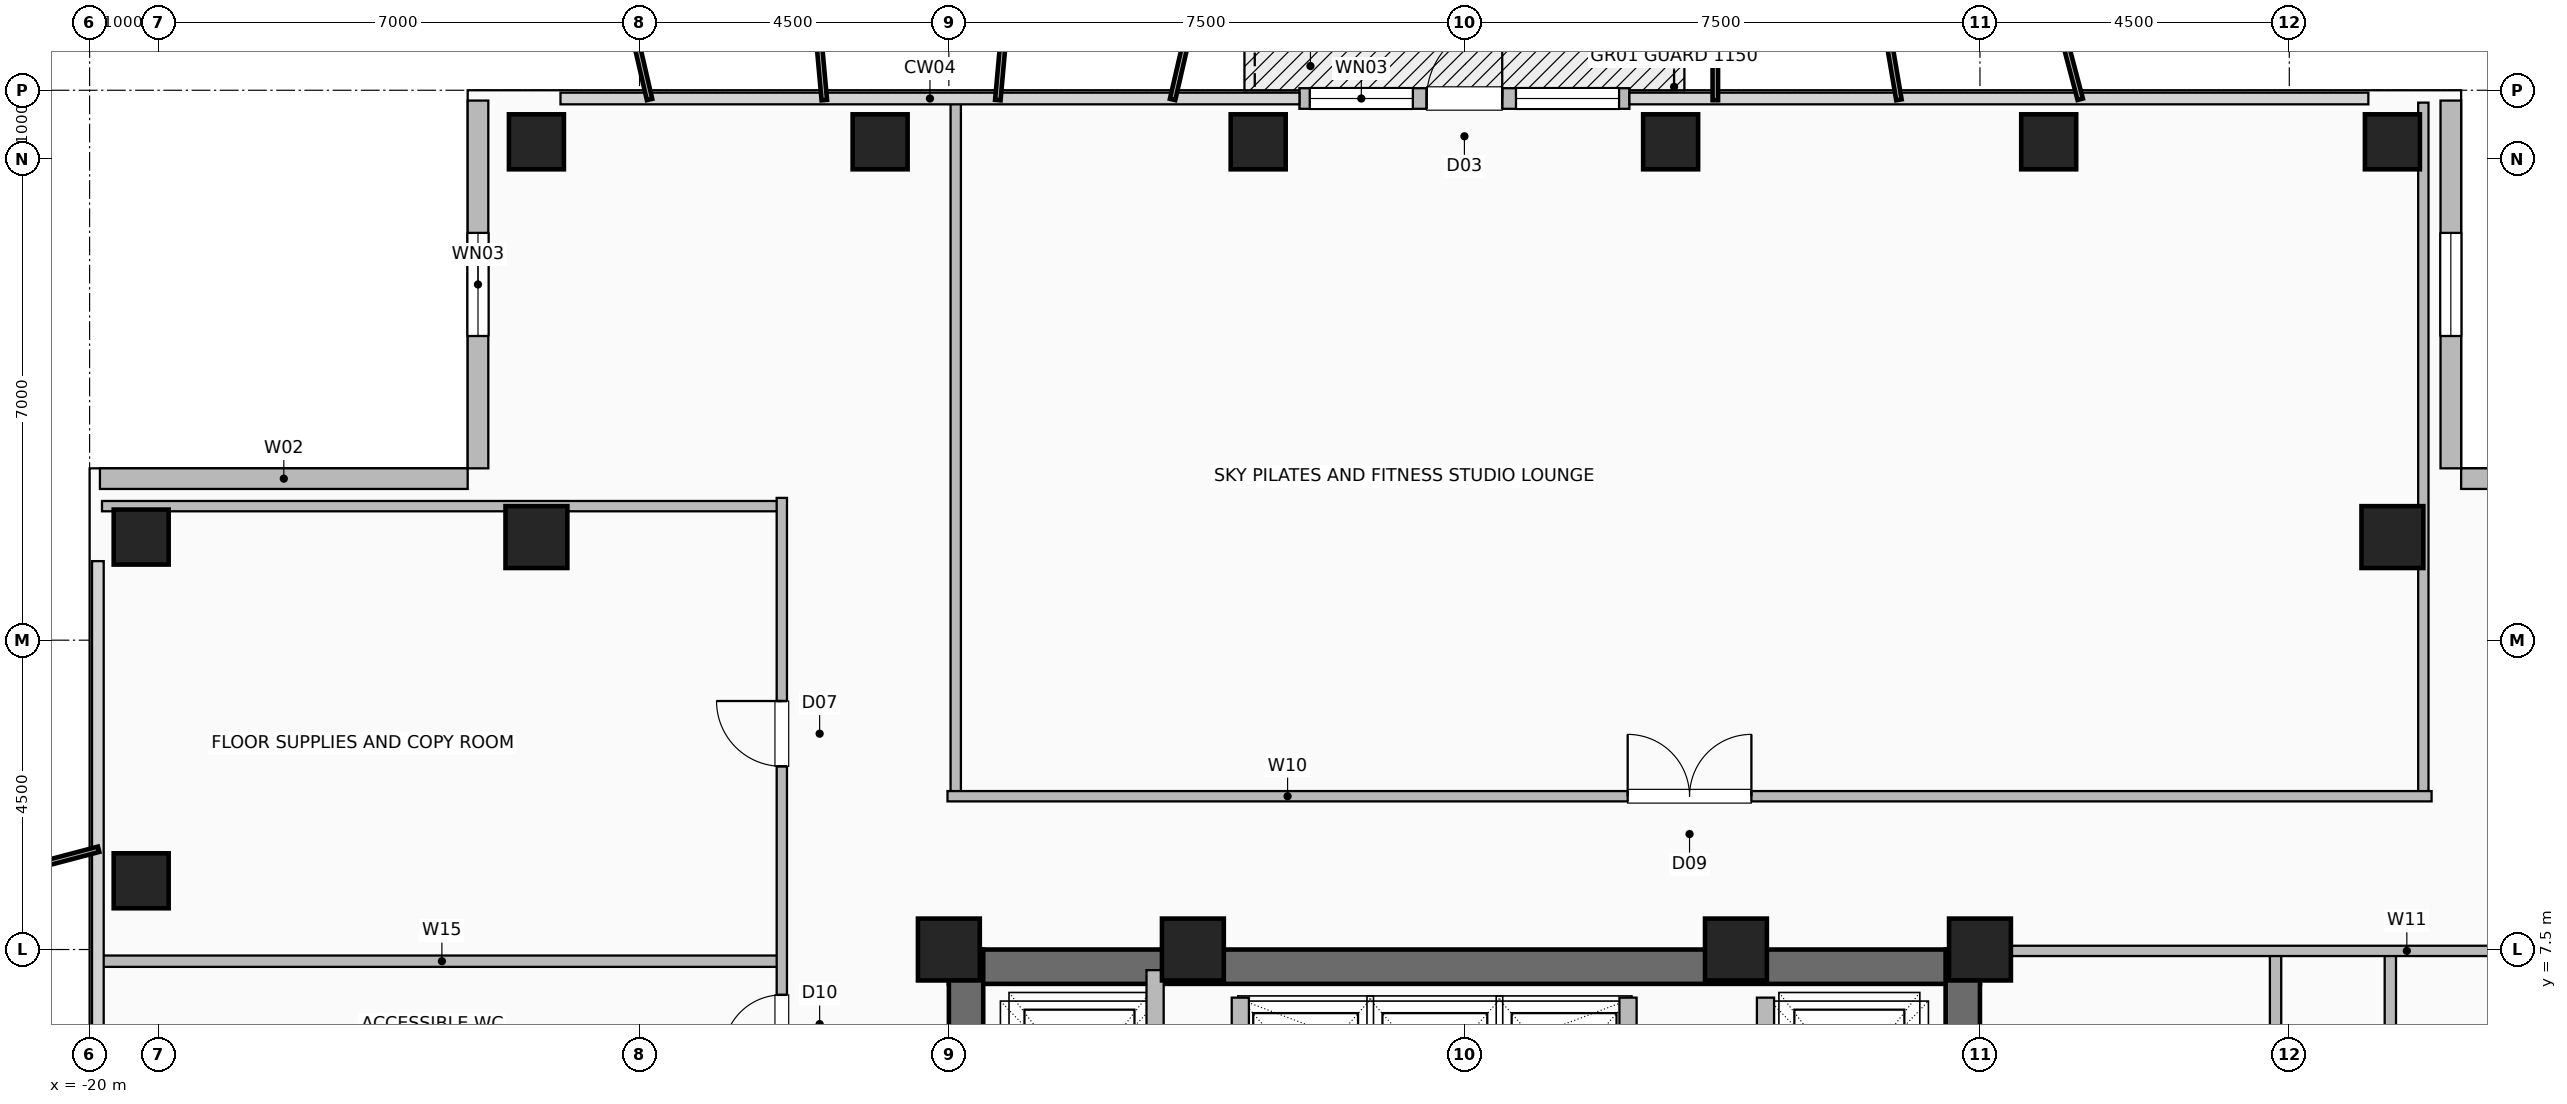
"""IFC4 building model, lengths in metres.
Left out: names, types, materials, properties, quantities, classifications, styles, units other than length and angle.
Written with IfcOpenShell. Run it as: python <this file> out.ifc"""

import sys

from ifc_helpers import new_model, si_unit, direction, frame, frame_2d, origin, origin_2d, place, context, subcontext, project, spatial, rectangle, hollow_rectangle, extrude, element, fill, save


model = new_model("IFC4")
c1 = context("Model", 3, precision=1e-05, world=origin(), true_north=direction((0.0, 1.0)))
c2 = subcontext(c1, "Body", "Model", "MODEL_VIEW")
j1 = project(units=[si_unit("LENGTHUNIT", "METRE"), si_unit("PLANEANGLEUNIT", "RADIAN")], contexts=[c1])
p1 = place(None, origin())
s1 = spatial("IfcSite", under=j1, at=p1, CompositionType="ELEMENT")
p2 = place(p1, origin())
s2 = spatial("IfcBuilding", under=s1, at=p2, CompositionType="ELEMENT")
p3 = place(p2, frame((0.0, 0.0, 205.8)))
s3 = spatial("IfcBuildingStorey", under=s2, at=p3, CompositionType="ELEMENT", Elevation=205.8)
for number, where, z_axis, x_axis in (
    (1, (7.5, 7.5, 0.0), (0.0, 0.0, 1.0), (1.0, 0.0, 0.0)),
    (2, (3.95, 7.5, 0.0), (0.0, 0.0, 1.0), (1.0, 0.0, 0.0)),
    (3, (-3.95, 7.5, 0.0), (0.0, 0.0, 1.0), (1.0, 0.0, 0.0)),
    (4, (-7.5, 7.5, 0.0), (0.0, 0.0, 1.0), (1.0, 0.0, 0.0)),
):
    element("IfcColumn", number, at=place(p3, frame(where, z_axis=z_axis, x_axis=x_axis)), inside=s3, PredefinedType="COLUMN", context=c2, shape_type="SweptSolid", body=[
        extrude(hollow_rectangle(XDim=0.9, YDim=0.9, WallThickness=0.045, at=origin_2d()), origin(), (0.0, 0.0, 1.0), 3.6),
    ])
for number, where, z_axis, x_axis in (
    (5, (-13.5, 19.25, 0.0), (0.0, 0.0, 1.0), (1.0, 0.0, 0.0)),
    (6, (-8.5, 19.25, 0.0), (0.0, 0.0, 1.0), (1.0, 0.0, 0.0)),
    (7, (-3.0, 19.25, 0.0), (0.0, 0.0, 1.0), (1.0, 0.0, 0.0)),
    (8, (3.0, 19.25, 0.0), (0.0, 0.0, 1.0), (1.0, 0.0, 0.0)),
    (9, (8.5, 19.25, 0.0), (0.0, 0.0, 1.0), (1.0, 0.0, 0.0)),
    (10, (-19.25, 8.5, 0.0), (0.0, 0.0, 1.0), (1.0, 0.0, 0.0)),
    (11, (13.5, 19.25, 0.0), (0.0, 0.0, 1.0), (1.0, 0.0, 0.0)),
    (12, (-19.25, 13.5, 0.0), (0.0, 0.0, 1.0), (1.0, 0.0, 0.0)),
):
    element("IfcColumn", number, at=place(p3, frame(where, z_axis=z_axis, x_axis=x_axis)), inside=s3, PredefinedType="COLUMN", context=c2, shape_type="SweptSolid", body=[
        extrude(hollow_rectangle(XDim=0.8, YDim=0.8, WallThickness=0.04, at=origin_2d()), origin(), (0.0, 0.0, 1.0), 3.6),
    ])
for number, where, z_axis, x_axis in (
    (13, (13.5, 13.5, 0.0), (0.0, 0.0, 1.0), (1.0, 0.0, 0.0)),
    (14, (-13.5, 13.5, 0.0), (0.0, 0.0, 1.0), (1.0, 0.0, 0.0)),
):
    element("IfcColumn", number, at=place(p3, frame(where, z_axis=z_axis, x_axis=x_axis)), inside=s3, PredefinedType="COLUMN", context=c2, shape_type="SweptSolid", body=[
        extrude(hollow_rectangle(XDim=0.9, YDim=0.9, WallThickness=0.045, at=origin_2d()), origin(), (0.0, 0.0, 1.0), 3.6),
    ])
p4 = place(p3, frame((-2.4, 19.88, 0.0), z_axis=(0.0, 0.0, 1.0), x_axis=(1.0, 0.0, 0.0)))
e15 = element("IfcWall", 15, at=p4, inside=s3, PredefinedType="SOLIDWALL", context=c2, shape_type="SweptSolid", body=[
    extrude(rectangle(XDim=4.8, YDim=0.3, at=frame_2d((2.4, 0.0))), origin(), (0.0, 0.0, 1.0), 3.36),
])
p5 = place(p4, frame((1.85, 0.0, 0.0)))
e16 = element("IfcOpeningElement", 16, at=p5, cuts=e15, PredefinedType="OPENING", context=c2, shape_type="SweptSolid", body=[
    extrude(rectangle(XDim=1.1, YDim=2.2, at=frame_2d((0.55, 1.1))), frame((0.0, 0.16, 0.0), z_axis=(0.0, -1.0, 0.0), x_axis=(1.0, 0.0, 0.0)), (0.0, 0.0, 1.0), 0.32),
])
p6 = place(p4, frame((0.15, 0.0, 0.85)))
e17 = element("IfcOpeningElement", 17, at=p6, cuts=e15, PredefinedType="OPENING", context=c2, shape_type="SweptSolid", body=[
    extrude(rectangle(XDim=1.5, YDim=1.8, at=frame_2d((0.75, 0.9))), frame((0.0, 0.16, 0.0), z_axis=(0.0, -1.0, 0.0), x_axis=(1.0, 0.0, 0.0)), (0.0, 0.0, 1.0), 0.32),
])
p7 = place(p4, frame((3.15, 0.0, 0.85)))
e18 = element("IfcOpeningElement", 18, at=p7, cuts=e15, PredefinedType="OPENING", context=c2, shape_type="SweptSolid", body=[
    extrude(rectangle(XDim=1.5, YDim=1.8, at=frame_2d((0.75, 0.9))), frame((0.0, 0.16, 0.0), z_axis=(0.0, -1.0, 0.0), x_axis=(1.0, 0.0, 0.0)), (0.0, 0.0, 1.0), 0.32),
])
p8 = place(p3, frame((14.35, 19.85, 0.0), z_axis=(0.0, 0.0, 1.0), x_axis=(0.0, -1.0, 0.0)))
e19 = element("IfcWall", 19, at=p8, inside=s3, PredefinedType="SOLIDWALL", context=c2, shape_type="SweptSolid", body=[
    extrude(rectangle(XDim=5.35, YDim=0.3, at=frame_2d((2.675, 0.0))), origin(), (0.0, 0.0, 1.0), 3.36),
])
p9 = place(p8, frame((1.925, 0.0, 0.9)))
e20 = element("IfcOpeningElement", 20, at=p9, cuts=e19, PredefinedType="OPENING", context=c2, shape_type="SweptSolid", body=[
    extrude(rectangle(XDim=1.5, YDim=1.8, at=frame_2d((0.75, 0.9))), frame((0.0, 0.16, 0.0), z_axis=(0.0, -1.0, 0.0), x_axis=(1.0, 0.0, 0.0)), (0.0, 0.0, 1.0), 0.32),
])
p10 = place(p3, frame((19.85, 14.35, 0.0), z_axis=(0.0, 0.0, 1.0), x_axis=(-1.0, 0.0, 0.0)))
e21 = element("IfcWall", 21, at=p10, inside=s3, PredefinedType="SOLIDWALL", context=c2, shape_type="SweptSolid", body=[
    extrude(rectangle(XDim=5.35, YDim=0.3, at=frame_2d((2.675, 0.0))), origin(), (0.0, 0.0, 1.0), 3.36),
])
p11 = place(p3, frame((-14.35, 19.85, 0.0), z_axis=(0.0, 0.0, 1.0), x_axis=(0.0, -1.0, 0.0)))
e22 = element("IfcWall", 22, at=p11, inside=s3, PredefinedType="SOLIDWALL", context=c2, shape_type="SweptSolid", body=[
    extrude(rectangle(XDim=5.35, YDim=0.3, at=frame_2d((2.675, 0.0))), origin(), (0.0, 0.0, 1.0), 3.36),
])
p12 = place(p11, frame((1.925, 0.0, 0.9)))
e23 = element("IfcOpeningElement", 23, at=p12, cuts=e22, PredefinedType="OPENING", context=c2, shape_type="SweptSolid", body=[
    extrude(rectangle(XDim=1.5, YDim=1.8, at=frame_2d((0.75, 0.9))), frame((0.0, 0.16, 0.0), z_axis=(0.0, -1.0, 0.0), x_axis=(1.0, 0.0, 0.0)), (0.0, 0.0, 1.0), 0.32),
])
p13 = place(p3, frame((-19.85, 14.35, 0.0), z_axis=(0.0, 0.0, 1.0), x_axis=(1.0, 0.0, 0.0)))
e24 = element("IfcWall", 24, at=p13, inside=s3, PredefinedType="SOLIDWALL", context=c2, shape_type="SweptSolid", body=[
    extrude(rectangle(XDim=5.35, YDim=0.3, at=frame_2d((2.675, 0.0))), origin(), (0.0, 0.0, 1.0), 3.36),
])
p14 = place(p3, frame((-7.5, 7.25, 0.0), z_axis=(0.0, 0.0, 1.0), x_axis=(1.0, 0.0, 0.0)))
e25 = element("IfcWall", 25, at=p14, inside=s3, PredefinedType="SHEAR", context=c2, shape_type="SweptSolid", body=[
    extrude(rectangle(XDim=15.0, YDim=0.5, at=frame_2d((7.5, 0.0))), origin(), (0.0, 0.0, 1.0), 3.36),
])
p15 = place(p3, frame((-7.25, -7.5, 0.0), z_axis=(0.0, 0.0, 1.0), x_axis=(0.0, 1.0, 0.0)))
e26 = element("IfcWall", 26, at=p15, inside=s3, PredefinedType="SHEAR", context=c2, shape_type="SweptSolid", body=[
    extrude(rectangle(XDim=15.0, YDim=0.5, at=frame_2d((7.5, 0.0))), origin(), (0.0, 0.0, 1.0), 3.36),
])
p16 = place(p15, frame((9.5, 0.0, 0.0)))
e27 = element("IfcOpeningElement", 27, at=p16, cuts=e26, PredefinedType="OPENING", context=c2, shape_type="SweptSolid", body=[
    extrude(rectangle(XDim=1.0, YDim=2.08, at=frame_2d((0.5, 1.04))), frame((0.0, 0.26, 0.0), z_axis=(0.0, -1.0, 0.0), x_axis=(1.0, 0.0, 0.0)), (0.0, 0.0, 1.0), 0.52),
])
p17 = place(p3, frame((7.25, -7.5, 0.0), z_axis=(0.0, 0.0, 1.0), x_axis=(0.0, 1.0, 0.0)))
e28 = element("IfcWall", 28, at=p17, inside=s3, PredefinedType="SHEAR", context=c2, shape_type="SweptSolid", body=[
    extrude(rectangle(XDim=15.0, YDim=0.5, at=frame_2d((7.5, 0.0))), origin(), (0.0, 0.0, 1.0), 3.36),
])
for number, where, z_axis, x_axis in (
    (29, (-3.26, 4.58, 0.0), (0.0, 0.0, 1.0), (0.0, 1.0, 0.0)),
    (30, (2.38, 4.58, 0.0), (0.0, 0.0, 1.0), (0.0, 1.0, 0.0)),
):
    element("IfcWall", number, at=place(p3, frame(where, z_axis=z_axis, x_axis=x_axis)), inside=s3, PredefinedType="SHEAR", context=c2, shape_type="SweptSolid", body=[
        extrude(rectangle(XDim=2.22, YDim=0.25, at=frame_2d((1.11, 0.0))), origin(), (0.0, 0.0, 1.0), 3.36),
    ])
p18 = place(p3, frame((-4.5, 4.35, 0.0), z_axis=(0.0, 0.0, 1.0), x_axis=(0.0, 1.0, 0.0)))
e31 = element("IfcWall", 31, at=p18, inside=s3, PredefinedType="SHEAR", context=c2, shape_type="SweptSolid", body=[
    extrude(rectangle(XDim=2.85, YDim=0.25, at=frame_2d((1.425, 0.0))), origin(), (0.0, 0.0, 1.0), 3.36),
])
p19 = place(p3, frame((4.38, 4.3, 0.0), z_axis=(0.0, 0.0, 1.0), x_axis=(0.0, 1.0, 0.0)))
e32 = element("IfcWall", 32, at=p19, inside=s3, PredefinedType="SHEAR", context=c2, shape_type="SweptSolid", body=[
    extrude(rectangle(XDim=2.5, YDim=0.25, at=frame_2d((1.25, 0.0))), origin(), (0.0, 0.0, 1.0), 3.36),
])
p20 = place(p19, frame((0.8, 0.0, 0.0)))
e33 = element("IfcOpeningElement", 33, at=p20, cuts=e32, PredefinedType="OPENING", context=c2, shape_type="SweptSolid", body=[
    extrude(rectangle(XDim=1.2, YDim=2.2, at=frame_2d((0.6, 1.1))), frame((0.0, 0.135, 0.0), z_axis=(0.0, -1.0, 0.0), x_axis=(1.0, 0.0, 0.0)), (0.0, 0.0, 1.0), 0.27),
])
p21 = place(p3, frame((-19.82, 7.33, 0.0), z_axis=(0.0, 0.0, 1.0), x_axis=(1.0, 0.0, 0.0)))
e34 = element("IfcWall", 34, at=p21, inside=s3, PredefinedType="PLUMBINGWALL", context=c2, shape_type="SweptSolid", body=[
    extrude(rectangle(XDim=9.89, YDim=0.165, at=frame_2d((4.945, 0.0))), origin(), (0.0, 0.0, 1.0), 3.36),
])
p22 = place(p3, frame((-19.82, 13.95, 0.0), z_axis=(0.0, 0.0, 1.0), x_axis=(1.0, 0.0, 0.0)))
e35 = element("IfcWall", 35, at=p22, inside=s3, PredefinedType="PARTITIONING", context=c2, shape_type="SweptSolid", body=[
    extrude(rectangle(XDim=9.89, YDim=0.15, at=frame_2d((4.945, 0.0))), origin(), (0.0, 0.0, 1.0), 3.36),
])
p23 = place(p3, frame((-9.93, -7.52, 0.0), z_axis=(0.0, 0.0, 1.0), x_axis=(0.0, 1.0, 0.0)))
e36 = element("IfcWall", 36, at=p23, inside=s3, PredefinedType="PARTITIONING", context=c2, shape_type="SweptSolid", body=[
    extrude(rectangle(XDim=21.59, YDim=0.15, at=frame_2d((10.795, 0.0))), origin(), (0.0, 0.0, 1.0), 3.36),
])
p24 = place(p23, frame((2.595, 0.0, 0.0)))
e37 = element("IfcOpeningElement", 37, at=p24, cuts=e36, PredefinedType="OPENING", context=c2, shape_type="SweptSolid", body=[
    extrude(rectangle(XDim=0.95, YDim=2.06, at=frame_2d((0.475, 1.03))), frame((0.0, 0.085, 0.0), z_axis=(0.0, -1.0, 0.0), x_axis=(1.0, 0.0, 0.0)), (0.0, 0.0, 1.0), 0.17),
])
p25 = place(p23, frame((9.045, 0.0, 0.0)))
e38 = element("IfcOpeningElement", 38, at=p25, cuts=e36, PredefinedType="OPENING", context=c2, shape_type="SweptSolid", body=[
    extrude(rectangle(XDim=0.95, YDim=2.06, at=frame_2d((0.475, 1.03))), frame((0.0, 0.085, 0.0), z_axis=(0.0, -1.0, 0.0), x_axis=(1.0, 0.0, 0.0)), (0.0, 0.0, 1.0), 0.17),
])
p26 = place(p23, frame((13.51, 0.0, 0.0)))
e39 = element("IfcOpeningElement", 39, at=p26, cuts=e36, PredefinedType="OPENING", context=c2, shape_type="SweptSolid", body=[
    extrude(rectangle(XDim=0.85, YDim=2.05, at=frame_2d((0.425, 1.025))), frame((0.0, 0.085, 0.0), z_axis=(0.0, -1.0, 0.0), x_axis=(1.0, 0.0, 0.0)), (0.0, 0.0, 1.0), 0.17),
])
p27 = place(p23, frame((17.685, 0.0, 0.0)))
e40 = element("IfcOpeningElement", 40, at=p27, cuts=e36, PredefinedType="OPENING", context=c2, shape_type="SweptSolid", body=[
    extrude(rectangle(XDim=0.95, YDim=2.06, at=frame_2d((0.475, 1.03))), frame((0.0, 0.085, 0.0), z_axis=(0.0, -1.0, 0.0), x_axis=(1.0, 0.0, 0.0)), (0.0, 0.0, 1.0), 0.17),
])
for number, where, z_axis, x_axis in (
    (41, (-7.4, 9.73, 0.0), (0.0, 0.0, 1.0), (0.0, 1.0, 0.0)),
    (42, (13.95, 9.73, 0.0), (0.0, 0.0, 1.0), (0.0, 1.0, 0.0)),
):
    element("IfcWall", number, at=place(p3, frame(where, z_axis=z_axis, x_axis=x_axis)), inside=s3, PredefinedType="PARTITIONING", context=c2, shape_type="SweptSolid", body=[
        extrude(rectangle(XDim=10.09, YDim=0.15, at=frame_2d((5.045, 0.0))), origin(), (0.0, 0.0, 1.0), 3.36),
    ])
p28 = place(p3, frame((-7.52, 9.73, 0.0), z_axis=(0.0, 0.0, 1.0), x_axis=(1.0, 0.0, 0.0)))
e43 = element("IfcWall", 43, at=p28, inside=s3, PredefinedType="PARTITIONING", context=c2, shape_type="SweptSolid", body=[
    extrude(rectangle(XDim=21.59, YDim=0.15, at=frame_2d((10.795, 0.0))), origin(), (0.0, 0.0, 1.0), 3.36),
])
p29 = place(p28, frame((9.895, 0.0, 0.0)))
e44 = element("IfcOpeningElement", 44, at=p29, cuts=e43, PredefinedType="OPENING", context=c2, shape_type="SweptSolid", body=[
    extrude(rectangle(XDim=1.8, YDim=2.08, at=frame_2d((0.9, 1.04))), frame((0.0, 0.085, 0.0), z_axis=(0.0, -1.0, 0.0), x_axis=(1.0, 0.0, 0.0)), (0.0, 0.0, 1.0), 0.17),
])
for number, where, z_axis, x_axis in (
    (45, (13.47, -7.48, 0.0), (0.0, 0.0, 1.0), (0.0, 1.0, 0.0)),
    (46, (11.8, -7.48, 0.0), (0.0, 0.0, 1.0), (0.0, 1.0, 0.0)),
):
    element("IfcWall", number, at=place(p3, frame(where, z_axis=z_axis, x_axis=x_axis)), inside=s3, PredefinedType="PLUMBINGWALL", context=c2, shape_type="SweptSolid", body=[
        extrude(rectangle(XDim=14.9, YDim=0.165, at=frame_2d((7.45, 0.0))), origin(), (0.0, 0.0, 1.0), 3.36),
    ])
p30 = place(p3, frame((7.6, 7.48, 0.0), z_axis=(0.0, 0.0, 1.0), x_axis=(1.0, 0.0, 0.0)))
e47 = element("IfcWall", 47, at=p30, inside=s3, PredefinedType="PARTITIONING", context=c2, shape_type="SweptSolid", body=[
    extrude(rectangle(XDim=12.22, YDim=0.15, at=frame_2d((6.11, 0.0))), origin(), (0.0, 0.0, 1.0), 3.36),
])
p31 = place(p5, origin())
e48 = element("IfcDoor", 48, at=p31, inside=s3, OperationType="SINGLE_SWING_RIGHT", PredefinedType="DOOR", context=c2, shape_type="SweptSolid", body=[
    extrude(rectangle(XDim=1.1, YDim=2.2, at=frame_2d((0.55, 1.1))), frame((0.0, 0.025, 0.0), z_axis=(0.0, -1.0, 0.0), x_axis=(1.0, 0.0, 0.0)), (0.0, 0.0, 1.0), 0.05),
])
fill(e16, e48)
p32 = place(p6, origin())
e49 = element("IfcWindow", 49, at=p32, inside=s3, PartitioningType="SINGLE_PANEL", PredefinedType="WINDOW", context=c2, shape_type="SweptSolid", body=[
    extrude(rectangle(XDim=1.5, YDim=1.8, at=frame_2d((0.75, 0.9))), frame((0.0, 0.03, 0.0), z_axis=(0.0, -1.0, 0.0), x_axis=(1.0, 0.0, 0.0)), (0.0, 0.0, 1.0), 0.06),
])
fill(e17, e49)
p33 = place(p7, origin())
e50 = element("IfcWindow", 50, at=p33, inside=s3, PartitioningType="SINGLE_PANEL", PredefinedType="WINDOW", context=c2, shape_type="SweptSolid", body=[
    extrude(rectangle(XDim=1.5, YDim=1.8, at=frame_2d((0.75, 0.9))), frame((0.0, 0.03, 0.0), z_axis=(0.0, -1.0, 0.0), x_axis=(1.0, 0.0, 0.0)), (0.0, 0.0, 1.0), 0.06),
])
fill(e18, e50)
p34 = place(p9, origin())
e51 = element("IfcWindow", 51, at=p34, inside=s3, PartitioningType="SINGLE_PANEL", PredefinedType="WINDOW", context=c2, shape_type="SweptSolid", body=[
    extrude(rectangle(XDim=1.5, YDim=1.8, at=frame_2d((0.75, 0.9))), frame((0.0, 0.03, 0.0), z_axis=(0.0, -1.0, 0.0), x_axis=(1.0, 0.0, 0.0)), (0.0, 0.0, 1.0), 0.06),
])
fill(e20, e51)
p35 = place(p12, origin())
e52 = element("IfcWindow", 52, at=p35, inside=s3, PartitioningType="SINGLE_PANEL", PredefinedType="WINDOW", context=c2, shape_type="SweptSolid", body=[
    extrude(rectangle(XDim=1.5, YDim=1.8, at=frame_2d((0.75, 0.9))), frame((0.0, 0.03, 0.0), z_axis=(0.0, -1.0, 0.0), x_axis=(1.0, 0.0, 0.0)), (0.0, 0.0, 1.0), 0.06),
])
fill(e23, e52)
p36 = place(p26, origin())
e53 = element("IfcDoor", 53, at=p36, inside=s3, OperationType="SINGLE_SWING_LEFT", PredefinedType="DOOR", context=c2, shape_type="SweptSolid", body=[
    extrude(rectangle(XDim=0.85, YDim=2.05, at=frame_2d((0.425, 1.025))), frame((0.0, 0.025, 0.0), z_axis=(0.0, -1.0, 0.0), x_axis=(1.0, 0.0, 0.0)), (0.0, 0.0, 1.0), 0.05),
])
fill(e39, e53)
p37 = place(p27, origin())
e54 = element("IfcDoor", 54, at=p37, inside=s3, OperationType="SINGLE_SWING_RIGHT", PredefinedType="DOOR", context=c2, shape_type="SweptSolid", body=[
    extrude(rectangle(XDim=0.95, YDim=2.06, at=frame_2d((0.475, 1.03))), frame((0.0, 0.025, 0.0), z_axis=(0.0, -1.0, 0.0), x_axis=(1.0, 0.0, 0.0)), (0.0, 0.0, 1.0), 0.05),
])
fill(e40, e54)
p38 = place(p29, origin())
e55 = element("IfcDoor", 55, at=p38, inside=s3, OperationType="DOUBLE_DOOR_SINGLE_SWING", PredefinedType="DOOR", context=c2, shape_type="SweptSolid", body=[
    extrude(rectangle(XDim=1.8, YDim=2.08, at=frame_2d((0.9, 1.04))), frame((0.0, 0.025, 0.0), z_axis=(0.0, -1.0, 0.0), x_axis=(1.0, 0.0, 0.0)), (0.0, 0.0, 1.0), 0.05),
])
fill(e44, e55)
save(model, sys.argv[1])
